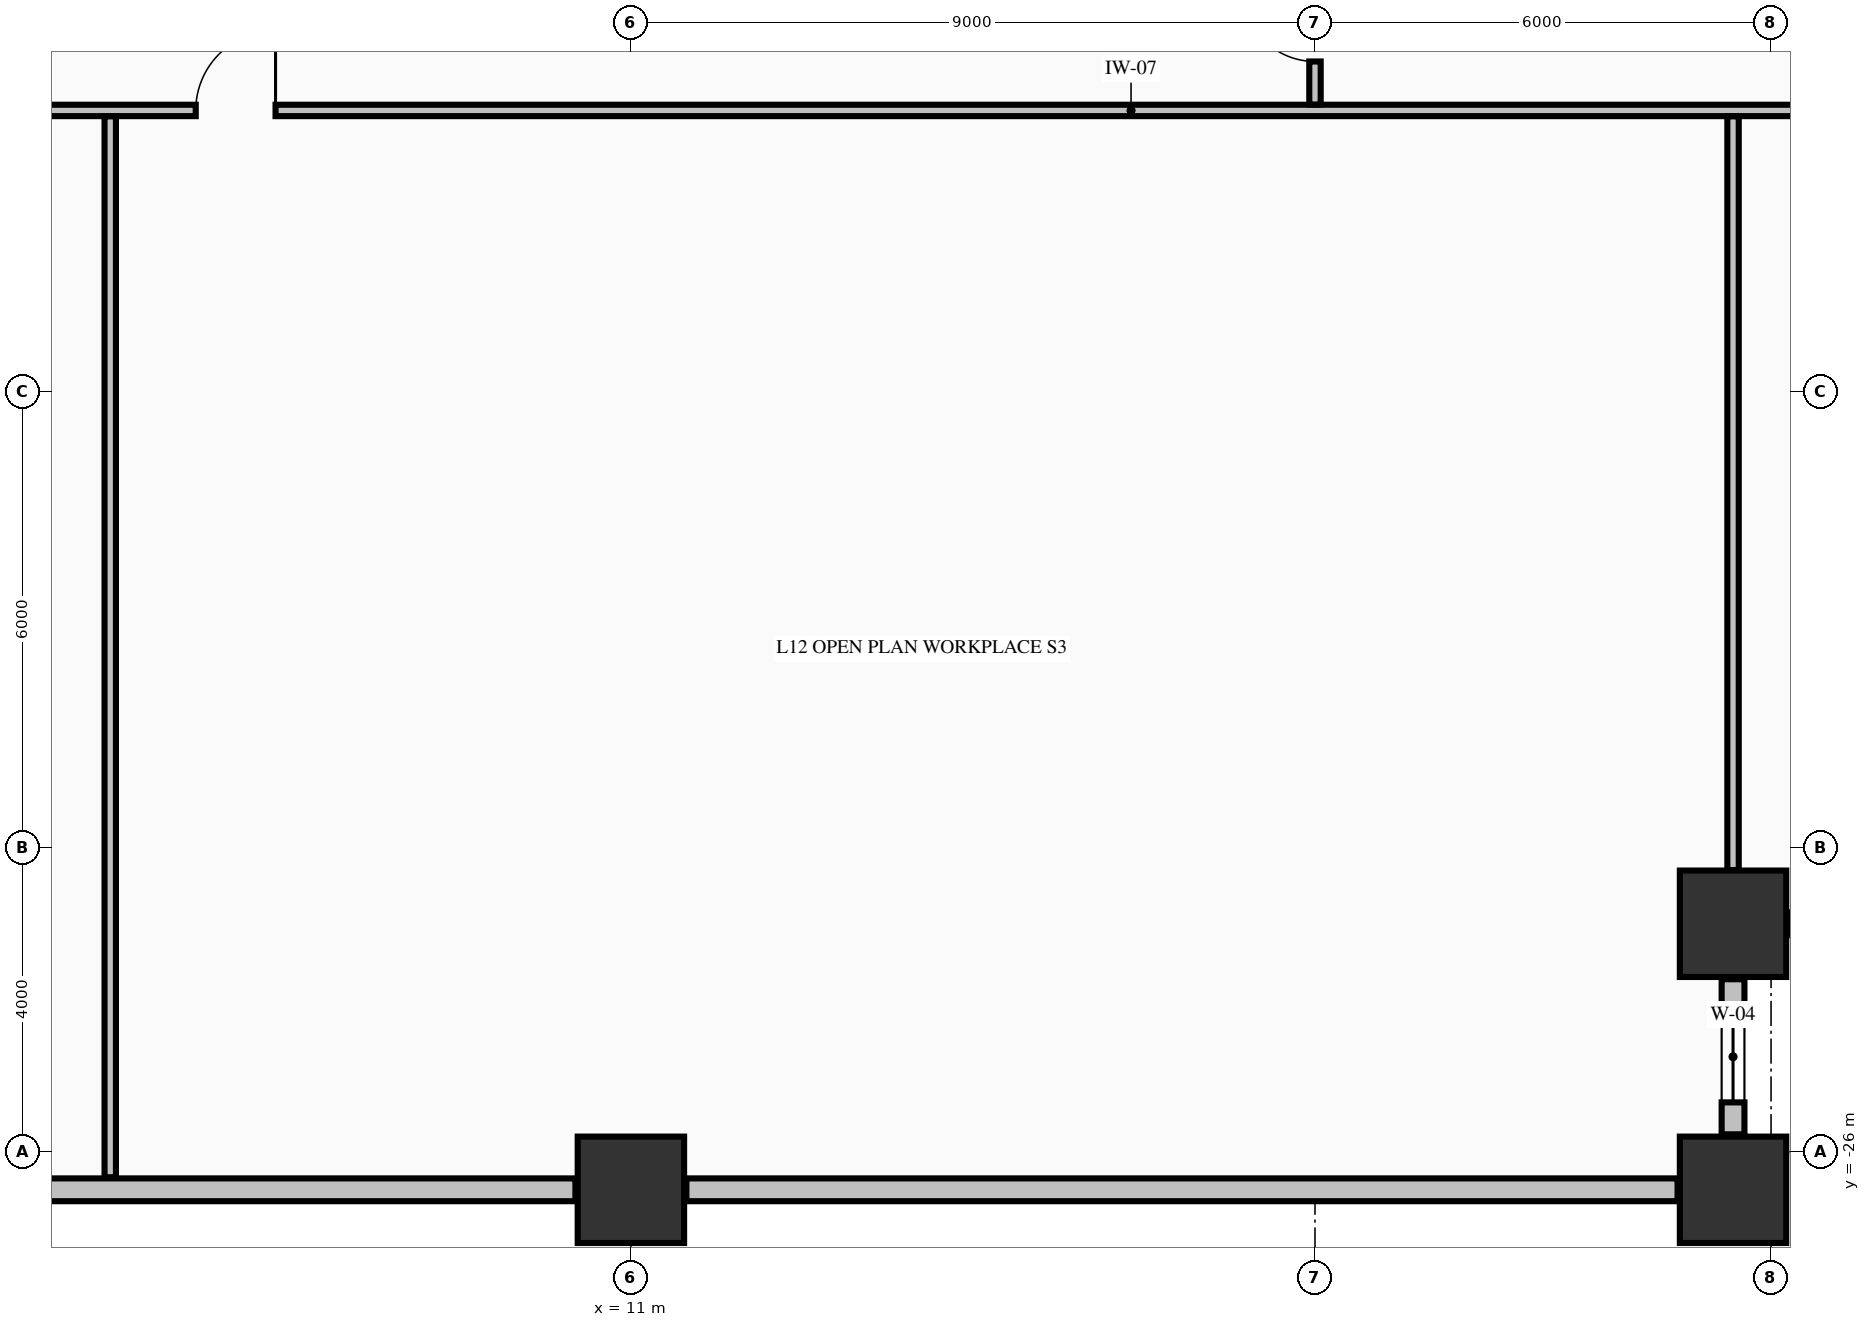
"""IFC4 building model, lengths in metres.
Left out: names, types, materials, properties, quantities, classifications, styles, units other than length and angle.
Written with IfcOpenShell. Run it as: python <this file> out.ifc"""

import sys

from ifc_helpers import new_model, si_unit, direction, frame, frame_2d, origin, origin_2d, place, context, subcontext, project, spatial, rectangle, extrude, element, fill, save


model = new_model("IFC4")
c1 = context("Model", 3, precision=1e-05, world=origin(), true_north=direction((0.0, 1.0)))
c2 = subcontext(c1, "Body", "Model", "MODEL_VIEW")
j1 = project(units=[si_unit("LENGTHUNIT", "METRE"), si_unit("PLANEANGLEUNIT", "RADIAN")], contexts=[c1])
p1 = place(None, origin())
s1 = spatial("IfcSite", under=j1, at=p1, CompositionType="ELEMENT")
p2 = place(p1, origin())
s2 = spatial("IfcBuilding", under=s1, at=p2, CompositionType="ELEMENT")
p3 = place(p2, frame((0.0, 0.0, 52.19)))
s3 = spatial("IfcBuildingStorey", under=s2, at=p3, CompositionType="ELEMENT", Elevation=52.19)
for number, where, z_axis, x_axis in (
    (1, (11.0, -26.5, -0.425), (0.0, 0.0, 1.0), (1.0, 0.0, 0.0)),
    (2, (25.5, -26.5, -0.425), (0.0, 0.0, 1.0), (1.0, 0.0, 0.0)),
    (3, (25.5, -23.0, -0.425), (0.0, 0.0, 1.0), (1.0, 0.0, 0.0)),
):
    element("IfcColumn", number, at=place(p3, frame(where, z_axis=z_axis, x_axis=x_axis)), inside=s3, PredefinedType="COLUMN", context=c2, shape_type="SweptSolid", body=[
        extrude(rectangle(XDim=1.4, YDim=1.4, at=origin_2d()), origin(), (0.0, 0.0, 1.0), 5.0),
    ])
p4 = place(p3, frame((25.5, -25.77, 0.0), z_axis=(0.0, 0.0, 1.0), x_axis=(0.0, 1.0, 0.0)))
e4 = element("IfcWall", 4, at=p4, inside=s3, PredefinedType="STANDARD", context=c2, shape_type="SweptSolid", body=[
    extrude(rectangle(XDim=2.04, YDim=0.3, at=frame_2d((1.02, 0.0))), origin(), (0.0, 0.0, 1.0), 2.767),
])
p5 = place(p4, frame((0.42, 0.0, 0.82)))
e5 = element("IfcOpeningElement", 5, at=p5, cuts=e4, PredefinedType="OPENING", context=c2, shape_type="SweptSolid", body=[
    extrude(rectangle(XDim=1.2, YDim=1.65, at=frame_2d((0.6, 0.825))), frame((0.0, 0.16, 0.0), z_axis=(0.0, -1.0, 0.0), x_axis=(1.0, 0.0, 0.0)), (0.0, 0.0, 1.0), 0.32),
])
p6 = place(p3, frame((26.23, -23.0, 0.0), z_axis=(0.0, 0.0, 1.0), x_axis=(1.0, 0.0, 0.0)))
e6 = element("IfcWall", 6, at=p6, inside=s3, PredefinedType="STANDARD", context=c2, shape_type="SweptSolid", body=[
    extrude(rectangle(XDim=2.04, YDim=0.3, at=frame_2d((1.02, 0.0))), origin(), (0.0, 0.0, 1.0), 2.167),
])
p7 = place(p3, frame((0.73, -26.5, 0.0), z_axis=(0.0, 0.0, 1.0), x_axis=(1.0, 0.0, 0.0)))
e7 = element("IfcWall", 7, at=p7, inside=s3, PredefinedType="STANDARD", context=c2, shape_type="SweptSolid", body=[
    extrude(rectangle(XDim=9.54, YDim=0.3, at=frame_2d((4.77, 0.0))), origin(), (0.0, 0.0, 1.0), 2.167),
])
p8 = place(p3, frame((11.73, -26.5, 0.0), z_axis=(0.0, 0.0, 1.0), x_axis=(1.0, 0.0, 0.0)))
e8 = element("IfcWall", 8, at=p8, inside=s3, PredefinedType="STANDARD", context=c2, shape_type="SweptSolid", body=[
    extrude(rectangle(XDim=13.04, YDim=0.3, at=frame_2d((6.52, 0.0))), origin(), (0.0, 0.0, 1.0), 2.167),
])
p9 = place(p3, frame((-23.835, -12.3, 0.0), z_axis=(0.0, 0.0, 1.0), x_axis=(1.0, 0.0, 0.0)))
e9 = element("IfcWall", 9, at=p9, inside=s3, PredefinedType="PARTITIONING", context=c2, shape_type="SweptSolid", body=[
    extrude(rectangle(XDim=52.67, YDim=0.15, at=frame_2d((26.335, 0.0))), origin(), (0.0, 0.0, 1.0), 4.575),
])
p10 = place(p9, frame((8.99, 0.0, 0.0)))
e10 = element("IfcOpeningElement", 10, at=p10, cuts=e9, PredefinedType="OPENING", context=c2, shape_type="SweptSolid", body=[
    extrude(rectangle(XDim=1.05, YDim=2.15, at=frame_2d((0.525, 1.075))), frame((0.0, 0.085, 0.0), z_axis=(0.0, -1.0, 0.0), x_axis=(1.0, 0.0, 0.0)), (0.0, 0.0, 1.0), 0.17),
])
p11 = place(p9, frame((20.96, 0.0, 0.0)))
e11 = element("IfcOpeningElement", 11, at=p11, cuts=e9, PredefinedType="OPENING", context=c2, shape_type="SweptSolid", body=[
    extrude(rectangle(XDim=1.05, YDim=2.15, at=frame_2d((0.525, 1.075))), frame((0.0, 0.085, 0.0), z_axis=(0.0, -1.0, 0.0), x_axis=(1.0, 0.0, 0.0)), (0.0, 0.0, 1.0), 0.17),
])
p12 = place(p9, frame((29.11, 0.0, 0.0)))
e12 = element("IfcOpeningElement", 12, at=p12, cuts=e9, PredefinedType="OPENING", context=c2, shape_type="SweptSolid", body=[
    extrude(rectangle(XDim=1.05, YDim=2.15, at=frame_2d((0.525, 1.075))), frame((0.0, 0.085, 0.0), z_axis=(0.0, -1.0, 0.0), x_axis=(1.0, 0.0, 0.0)), (0.0, 0.0, 1.0), 0.17),
])
p13 = place(p3, frame((4.15, -26.335, 0.0), z_axis=(0.0, 0.0, 1.0), x_axis=(0.0, 1.0, 0.0)))
e13 = element("IfcWall", 13, at=p13, inside=s3, PredefinedType="PARTITIONING", context=c2, shape_type="SweptSolid", body=[
    extrude(rectangle(XDim=13.957, YDim=0.15, at=frame_2d((6.979, 0.0))), origin(), (0.0, 0.0, 1.0), 4.575),
])
p14 = place(p3, frame((20.0, -12.222, 0.0), z_axis=(0.0, 0.0, 1.0), x_axis=(0.0, 1.0, 0.0)))
e14 = element("IfcWall", 14, at=p14, inside=s3, PredefinedType="PARTITIONING", context=c2, shape_type="SweptSolid", body=[
    extrude(rectangle(XDim=1.666, YDim=0.15, at=frame_2d((0.833, 0.0))), origin(), (0.0, 0.0, 1.0), 4.575),
])
p15 = place(p14, frame((0.566, 0.0, 0.0)))
e15 = element("IfcOpeningElement", 15, at=p15, cuts=e14, PredefinedType="OPENING", context=c2, shape_type="SweptSolid", body=[
    extrude(rectangle(XDim=0.95, YDim=2.02, at=frame_2d((0.475, 1.01))), frame((0.0, 0.085, 0.0), z_axis=(0.0, -1.0, 0.0), x_axis=(1.0, 0.0, 0.0)), (0.0, 0.0, 1.0), 0.17),
])
p16 = place(p3, frame((25.5, -22.294, 0.0), z_axis=(0.0, 0.0, 1.0), x_axis=(0.0, 1.0, 0.0)))
e16 = element("IfcWall", 16, at=p16, inside=s3, PredefinedType="PARTITIONING", context=c2, shape_type="SweptSolid", body=[
    extrude(rectangle(XDim=9.916, YDim=0.15, at=frame_2d((4.958, 0.0))), origin(), (0.0, 0.0, 1.0), 4.575),
])
p17 = place(p5, origin())
e17 = element("IfcWindow", 17, at=p17, inside=s3, PartitioningType="SINGLE_PANEL", PredefinedType="WINDOW", context=c2, shape_type="SweptSolid", body=[
    extrude(rectangle(XDim=1.2, YDim=1.65, at=frame_2d((0.6, 0.825))), frame((0.0, 0.03, 0.0), z_axis=(0.0, -1.0, 0.0), x_axis=(1.0, 0.0, 0.0)), (0.0, 0.0, 1.0), 0.06),
])
fill(e5, e17)
p18 = place(p12, origin())
e18 = element("IfcDoor", 18, at=p18, inside=s3, OperationType="SINGLE_SWING_RIGHT", PredefinedType="DOOR", context=c2, shape_type="SweptSolid", body=[
    extrude(rectangle(XDim=1.05, YDim=2.15, at=frame_2d((0.525, 1.075))), frame((0.0, 0.025, 0.0), z_axis=(0.0, -1.0, 0.0), x_axis=(1.0, 0.0, 0.0)), (0.0, 0.0, 1.0), 0.05),
])
fill(e12, e18)
p19 = place(p15, origin())
e19 = element("IfcDoor", 19, at=p19, inside=s3, OperationType="SINGLE_SWING_RIGHT", PredefinedType="DOOR", context=c2, shape_type="SweptSolid", body=[
    extrude(rectangle(XDim=0.95, YDim=2.02, at=frame_2d((0.475, 1.01))), frame((0.0, 0.025, 0.0), z_axis=(0.0, -1.0, 0.0), x_axis=(1.0, 0.0, 0.0)), (0.0, 0.0, 1.0), 0.05),
])
fill(e15, e19)
save(model, sys.argv[1])
